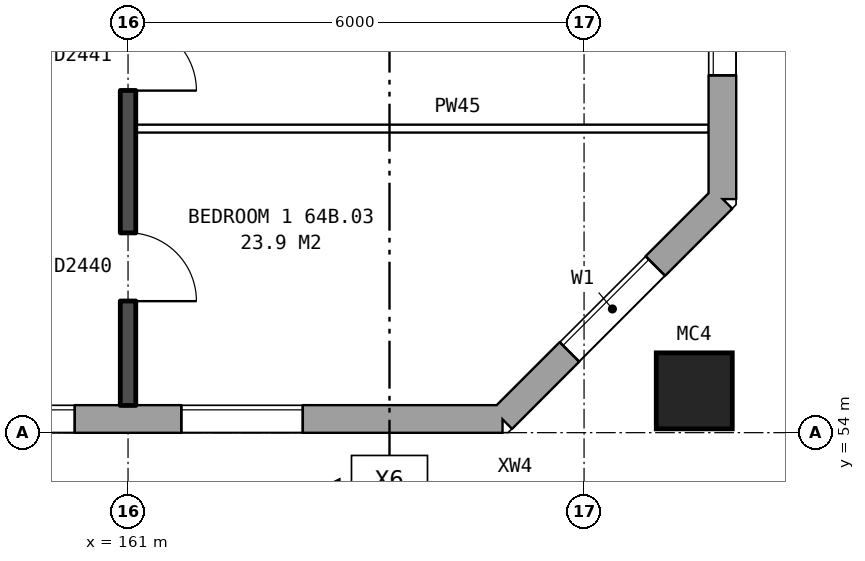
"""IFC4 building model, lengths in metres.
Left out: names, types, materials, properties, quantities, classifications, styles, units other than length and angle.
Written with IfcOpenShell. Run it as: python <this file> out.ifc"""

import sys

from ifc_helpers import new_model, si_unit, direction, frame, frame_2d, origin, origin_2d, place, context, subcontext, project, spatial, rectangle, hollow_rectangle, extrude, element, fill, save


model = new_model("IFC4")
c1 = context("Model", 3, precision=1e-05, world=origin(), true_north=direction((0.0, 1.0)))
c2 = subcontext(c1, "Body", "Model", "MODEL_VIEW")
j1 = project(units=[si_unit("LENGTHUNIT", "METRE"), si_unit("PLANEANGLEUNIT", "RADIAN")], contexts=[c1])
p1 = place(None, origin())
s1 = spatial("IfcSite", under=j1, at=p1, CompositionType="ELEMENT")
p2 = place(p1, origin())
s2 = spatial("IfcBuilding", under=s1, at=p2, CompositionType="ELEMENT")
p3 = place(p2, frame((0.0, 0.0, 227.6)))
s3 = spatial("IfcBuildingStorey", under=s2, at=p3, CompositionType="ELEMENT", Elevation=227.6)
p4 = place(p3, frame((168.45, 54.55, 0.0), z_axis=(0.0, 0.0, 1.0), x_axis=(1.0, 0.0, 0.0)))
e1 = element("IfcColumn", 1, at=p4, inside=s3, PredefinedType="COLUMN", context=c2, shape_type="SweptSolid", body=[
    extrude(hollow_rectangle(XDim=1.0, YDim=1.0, WallThickness=0.055, at=origin_2d()), origin(), (0.0, 0.0, 1.0), 3.1),
])
p5 = place(p3, frame((132.05, 54.18, 0.0), z_axis=(0.0, 0.0, 1.0), x_axis=(1.0, 0.0, 0.0)))
e2 = element("IfcWall", 2, at=p5, inside=s3, PredefinedType="STANDARD", context=c2, shape_type="SweptSolid", body=[
    extrude(rectangle(XDim=33.875, YDim=0.36, at=frame_2d((16.938, 0.0))), origin(), (0.0, 0.0, 1.0), 2.85),
])
p6 = place(p5, frame((2.65, 0.0, 0.8)))
e3 = element("IfcOpeningElement", 3, at=p6, cuts=e2, PredefinedType="OPENING", context=c2, shape_type="SweptSolid", body=[
    extrude(rectangle(XDim=1.6, YDim=1.8, at=frame_2d((0.8, 0.9))), frame((0.0, 0.19, 0.0), z_axis=(0.0, -1.0, 0.0), x_axis=(1.0, 0.0, 0.0)), (0.0, 0.0, 1.0), 0.38),
])
p7 = place(p5, frame((5.65, 0.0, 0.8)))
e4 = element("IfcOpeningElement", 4, at=p7, cuts=e2, PredefinedType="OPENING", context=c2, shape_type="SweptSolid", body=[
    extrude(rectangle(XDim=1.6, YDim=1.8, at=frame_2d((0.8, 0.9))), frame((0.0, 0.19, 0.0), z_axis=(0.0, -1.0, 0.0), x_axis=(1.0, 0.0, 0.0)), (0.0, 0.0, 1.0), 0.38),
])
p8 = place(p5, frame((8.65, 0.0, 0.8)))
e5 = element("IfcOpeningElement", 5, at=p8, cuts=e2, PredefinedType="OPENING", context=c2, shape_type="SweptSolid", body=[
    extrude(rectangle(XDim=1.6, YDim=1.8, at=frame_2d((0.8, 0.9))), frame((0.0, 0.19, 0.0), z_axis=(0.0, -1.0, 0.0), x_axis=(1.0, 0.0, 0.0)), (0.0, 0.0, 1.0), 0.38),
])
p9 = place(p5, frame((11.15, 0.0, 0.8)))
e6 = element("IfcOpeningElement", 6, at=p9, cuts=e2, PredefinedType="OPENING", context=c2, shape_type="SweptSolid", body=[
    extrude(rectangle(XDim=1.4, YDim=1.8, at=frame_2d((0.7, 0.9))), frame((0.0, 0.19, 0.0), z_axis=(0.0, -1.0, 0.0), x_axis=(1.0, 0.0, 0.0)), (0.0, 0.0, 1.0), 0.38),
])
p10 = place(p5, frame((15.05, 0.0, 0.8)))
e7 = element("IfcOpeningElement", 7, at=p10, cuts=e2, PredefinedType="OPENING", context=c2, shape_type="SweptSolid", body=[
    extrude(rectangle(XDim=1.6, YDim=1.8, at=frame_2d((0.8, 0.9))), frame((0.0, 0.19, 0.0), z_axis=(0.0, -1.0, 0.0), x_axis=(1.0, 0.0, 0.0)), (0.0, 0.0, 1.0), 0.38),
])
p11 = place(p5, frame((17.65, 0.0, 0.8)))
e8 = element("IfcOpeningElement", 8, at=p11, cuts=e2, PredefinedType="OPENING", context=c2, shape_type="SweptSolid", body=[
    extrude(rectangle(XDim=1.6, YDim=1.8, at=frame_2d((0.8, 0.9))), frame((0.0, 0.19, 0.0), z_axis=(0.0, -1.0, 0.0), x_axis=(1.0, 0.0, 0.0)), (0.0, 0.0, 1.0), 0.38),
])
p12 = place(p5, frame((20.1, 0.0, 0.35)))
e9 = element("IfcOpeningElement", 9, at=p12, cuts=e2, PredefinedType="OPENING", context=c2, shape_type="SweptSolid", body=[
    extrude(rectangle(XDim=1.0, YDim=1.8, at=frame_2d((0.5, 0.9))), frame((0.0, 0.19, 0.0), z_axis=(0.0, -1.0, 0.0), x_axis=(1.0, 0.0, 0.0)), (0.0, 0.0, 1.0), 0.38),
])
p13 = place(p5, frame((23.65, 0.0, 0.8)))
e10 = element("IfcOpeningElement", 10, at=p13, cuts=e2, PredefinedType="OPENING", context=c2, shape_type="SweptSolid", body=[
    extrude(rectangle(XDim=1.6, YDim=1.8, at=frame_2d((0.8, 0.9))), frame((0.0, 0.19, 0.0), z_axis=(0.0, -1.0, 0.0), x_axis=(1.0, 0.0, 0.0)), (0.0, 0.0, 1.0), 0.38),
])
p14 = place(p5, frame((26.65, 0.0, 0.8)))
e11 = element("IfcOpeningElement", 11, at=p14, cuts=e2, PredefinedType="OPENING", context=c2, shape_type="SweptSolid", body=[
    extrude(rectangle(XDim=1.6, YDim=1.8, at=frame_2d((0.8, 0.9))), frame((0.0, 0.19, 0.0), z_axis=(0.0, -1.0, 0.0), x_axis=(1.0, 0.0, 0.0)), (0.0, 0.0, 1.0), 0.38),
])
p15 = place(p5, frame((29.65, 0.0, 0.8)))
e12 = element("IfcOpeningElement", 12, at=p15, cuts=e2, PredefinedType="OPENING", context=c2, shape_type="SweptSolid", body=[
    extrude(rectangle(XDim=1.6, YDim=1.8, at=frame_2d((0.8, 0.9))), frame((0.0, 0.19, 0.0), z_axis=(0.0, -1.0, 0.0), x_axis=(1.0, 0.0, 0.0)), (0.0, 0.0, 1.0), 0.38),
])
p16 = place(p5, frame((12.85, 0.0, 1.7)))
e13 = element("IfcOpeningElement", 13, at=p16, cuts=e2, PredefinedType="OPENING", context=c2, shape_type="SweptSolid", body=[
    extrude(rectangle(XDim=0.6, YDim=0.9, at=frame_2d((0.3, 0.45))), frame((0.0, 0.19, 0.0), z_axis=(0.0, -1.0, 0.0), x_axis=(1.0, 0.0, 0.0)), (0.0, 0.0, 1.0), 0.38),
])
p17 = place(p3, frame((165.925, 54.18, 0.0), z_axis=(0.0, 0.0, 1.0), x_axis=(0.707106781187, 0.707106781187, 0.0)))
e14 = element("IfcWall", 14, at=p17, inside=s3, PredefinedType="STANDARD", context=c2, shape_type="SweptSolid", body=[
    extrude(rectangle(XDim=4.094, YDim=0.36, at=frame_2d((2.047, 0.0))), origin(), (0.0, 0.0, 1.0), 2.85),
])
p18 = place(p17, frame((1.247, 0.0, 0.8)))
e15 = element("IfcOpeningElement", 15, at=p18, cuts=e14, PredefinedType="OPENING", context=c2, shape_type="SweptSolid", body=[
    extrude(rectangle(XDim=1.6, YDim=1.8, at=frame_2d((0.8, 0.9))), frame((0.0, 0.19, 0.0), z_axis=(0.0, -1.0, 0.0), x_axis=(1.0, 0.0, 0.0)), (0.0, 0.0, 1.0), 0.38),
])
p19 = place(p3, frame((168.82, 57.075, 0.0), z_axis=(0.0, 0.0, 1.0), x_axis=(0.0, 1.0, 0.0)))
e16 = element("IfcWall", 16, at=p19, inside=s3, PredefinedType="STANDARD", context=c2, shape_type="SweptSolid", body=[
    extrude(rectangle(XDim=25.851, YDim=0.36, at=frame_2d((12.925, 0.0))), origin(), (0.0, 0.0, 1.0), 2.85),
])
p20 = place(p19, frame((1.625, 0.0, 0.8)))
e17 = element("IfcOpeningElement", 17, at=p20, cuts=e16, PredefinedType="OPENING", context=c2, shape_type="SweptSolid", body=[
    extrude(rectangle(XDim=1.6, YDim=1.8, at=frame_2d((0.8, 0.9))), frame((0.0, 0.19, 0.0), z_axis=(0.0, -1.0, 0.0), x_axis=(1.0, 0.0, 0.0)), (0.0, 0.0, 1.0), 0.38),
])
p21 = place(p19, frame((4.425, 0.0, 1.7)))
e18 = element("IfcOpeningElement", 18, at=p21, cuts=e16, PredefinedType="OPENING", context=c2, shape_type="SweptSolid", body=[
    extrude(rectangle(XDim=0.6, YDim=0.9, at=frame_2d((0.3, 0.45))), frame((0.0, 0.19, 0.0), z_axis=(0.0, -1.0, 0.0), x_axis=(1.0, 0.0, 0.0)), (0.0, 0.0, 1.0), 0.38),
])
p22 = place(p19, frame((19.425, 0.0, 0.8)))
e19 = element("IfcOpeningElement", 19, at=p22, cuts=e16, PredefinedType="OPENING", context=c2, shape_type="SweptSolid", body=[
    extrude(rectangle(XDim=1.0, YDim=1.8, at=frame_2d((0.5, 0.9))), frame((0.0, 0.19, 0.0), z_axis=(0.0, -1.0, 0.0), x_axis=(1.0, 0.0, 0.0)), (0.0, 0.0, 1.0), 0.38),
])
p23 = place(p19, frame((22.625, 0.0, 0.8)))
e20 = element("IfcOpeningElement", 20, at=p23, cuts=e16, PredefinedType="OPENING", context=c2, shape_type="SweptSolid", body=[
    extrude(rectangle(XDim=1.6, YDim=1.8, at=frame_2d((0.8, 0.9))), frame((0.0, 0.19, 0.0), z_axis=(0.0, -1.0, 0.0), x_axis=(1.0, 0.0, 0.0)), (0.0, 0.0, 1.0), 0.38),
])
p24 = place(p19, frame((5.325, 0.0, 0.8)))
e21 = element("IfcOpeningElement", 21, at=p24, cuts=e16, PredefinedType="OPENING", context=c2, shape_type="SweptSolid", body=[
    extrude(rectangle(XDim=1.0, YDim=1.8, at=frame_2d((0.5, 0.9))), frame((0.0, 0.19, 0.0), z_axis=(0.0, -1.0, 0.0), x_axis=(1.0, 0.0, 0.0)), (0.0, 0.0, 1.0), 0.38),
])
p25 = place(p19, frame((20.725, 0.0, 1.6)))
e22 = element("IfcOpeningElement", 22, at=p25, cuts=e16, PredefinedType="OPENING", context=c2, shape_type="SweptSolid", body=[
    extrude(rectangle(XDim=0.6, YDim=0.9, at=frame_2d((0.3, 0.45))), frame((0.0, 0.19, 0.0), z_axis=(0.0, -1.0, 0.0), x_axis=(1.0, 0.0, 0.0)), (0.0, 0.0, 1.0), 0.38),
])
p26 = place(p3, frame((161.1, 58.0, 0.0), z_axis=(0.0, 0.0, 1.0), x_axis=(1.0, 0.0, 0.0)))
e23 = element("IfcWall", 23, at=p26, inside=s3, PredefinedType="PARTITIONING", context=c2, shape_type="SweptSolid", body=[
    extrude(rectangle(XDim=7.54, YDim=0.1, at=frame_2d((3.77, 0.0))), origin(), (0.0, 0.0, 1.0), 2.85),
])
p27 = place(p3, frame((161.0, 54.36, 0.0), z_axis=(0.0, 0.0, 1.0), x_axis=(0.0, 1.0, 0.0)))
e24 = element("IfcWall", 24, at=p27, inside=s3, PredefinedType="SOLIDWALL", context=c2, shape_type="SweptSolid", body=[
    extrude(rectangle(XDim=9.44, YDim=0.2, at=frame_2d((4.72, 0.0))), origin(), (0.0, 0.0, 1.0), 2.85),
])
p28 = place(p27, frame((1.37, 0.0, 0.0)))
e25 = element("IfcOpeningElement", 25, at=p28, cuts=e24, PredefinedType="OPENING", context=c2, shape_type="SweptSolid", body=[
    extrude(rectangle(XDim=0.9, YDim=2.1, at=frame_2d((0.45, 1.05))), frame((0.0, 0.11, 0.0), z_axis=(0.0, -1.0, 0.0), x_axis=(1.0, 0.0, 0.0)), (0.0, 0.0, 1.0), 0.22),
])
p29 = place(p27, frame((4.14, 0.0, 0.0)))
e26 = element("IfcOpeningElement", 26, at=p29, cuts=e24, PredefinedType="OPENING", context=c2, shape_type="SweptSolid", body=[
    extrude(rectangle(XDim=0.9, YDim=2.1, at=frame_2d((0.45, 1.05))), frame((0.0, 0.11, 0.0), z_axis=(0.0, -1.0, 0.0), x_axis=(1.0, 0.0, 0.0)), (0.0, 0.0, 1.0), 0.22),
])
p30 = place(p27, frame((7.59, 0.0, 0.0)))
e27 = element("IfcOpeningElement", 27, at=p30, cuts=e24, PredefinedType="OPENING", context=c2, shape_type="SweptSolid", body=[
    extrude(rectangle(XDim=0.9, YDim=2.1, at=frame_2d((0.45, 1.05))), frame((0.0, 0.11, 0.0), z_axis=(0.0, -1.0, 0.0), x_axis=(1.0, 0.0, 0.0)), (0.0, 0.0, 1.0), 0.22),
])
p31 = place(p14, origin())
e28 = element("IfcWindow", 28, at=p31, inside=s3, PartitioningType="SINGLE_PANEL", PredefinedType="WINDOW", context=c2, shape_type="SweptSolid", body=[
    extrude(rectangle(XDim=1.6, YDim=1.8, at=frame_2d((0.8, 0.9))), frame((0.0, 0.15, 0.0), z_axis=(0.0, -1.0, 0.0), x_axis=(1.0, 0.0, 0.0)), (0.0, 0.0, 1.0), 0.06),
])
fill(e11, e28)
p32 = place(p15, origin())
e29 = element("IfcWindow", 29, at=p32, inside=s3, PartitioningType="SINGLE_PANEL", PredefinedType="WINDOW", context=c2, shape_type="SweptSolid", body=[
    extrude(rectangle(XDim=1.6, YDim=1.8, at=frame_2d((0.8, 0.9))), frame((0.0, 0.15, 0.0), z_axis=(0.0, -1.0, 0.0), x_axis=(1.0, 0.0, 0.0)), (0.0, 0.0, 1.0), 0.06),
])
fill(e12, e29)
p33 = place(p18, origin())
e30 = element("IfcWindow", 30, at=p33, inside=s3, PartitioningType="SINGLE_PANEL", PredefinedType="WINDOW", context=c2, shape_type="SweptSolid", body=[
    extrude(rectangle(XDim=1.6, YDim=1.8, at=frame_2d((0.8, 0.9))), frame((0.0, 0.15, 0.0), z_axis=(0.0, -1.0, 0.0), x_axis=(1.0, 0.0, 0.0)), (0.0, 0.0, 1.0), 0.06),
])
fill(e15, e30)
p34 = place(p20, origin())
e31 = element("IfcWindow", 31, at=p34, inside=s3, PartitioningType="SINGLE_PANEL", PredefinedType="WINDOW", context=c2, shape_type="SweptSolid", body=[
    extrude(rectangle(XDim=1.6, YDim=1.8, at=frame_2d((0.8, 0.9))), frame((0.0, 0.15, 0.0), z_axis=(0.0, -1.0, 0.0), x_axis=(1.0, 0.0, 0.0)), (0.0, 0.0, 1.0), 0.06),
])
fill(e17, e31)
p35 = place(p28, frame((0.9, 0.0, 0.0), z_axis=(0.0, 0.0, 1.0), x_axis=(-1.0, 0.0, 0.0)))
e32 = element("IfcDoor", 32, at=p35, inside=s3, OperationType="SINGLE_SWING_RIGHT", PredefinedType="DOOR", context=c2, shape_type="SweptSolid", body=[
    extrude(rectangle(XDim=0.9, YDim=2.1, at=frame_2d((0.45, 1.05))), frame((0.0, 0.025, 0.0), z_axis=(0.0, -1.0, 0.0), x_axis=(1.0, 0.0, 0.0)), (0.0, 0.0, 1.0), 0.05),
])
fill(e25, e32)
p36 = place(p29, frame((0.9, 0.0, 0.0), z_axis=(0.0, 0.0, 1.0), x_axis=(-1.0, 0.0, 0.0)))
e33 = element("IfcDoor", 33, at=p36, inside=s3, OperationType="SINGLE_SWING_RIGHT", PredefinedType="DOOR", context=c2, shape_type="SweptSolid", body=[
    extrude(rectangle(XDim=0.9, YDim=2.1, at=frame_2d((0.45, 1.05))), frame((0.0, 0.025, 0.0), z_axis=(0.0, -1.0, 0.0), x_axis=(1.0, 0.0, 0.0)), (0.0, 0.0, 1.0), 0.05),
])
fill(e26, e33)
save(model, sys.argv[1])
